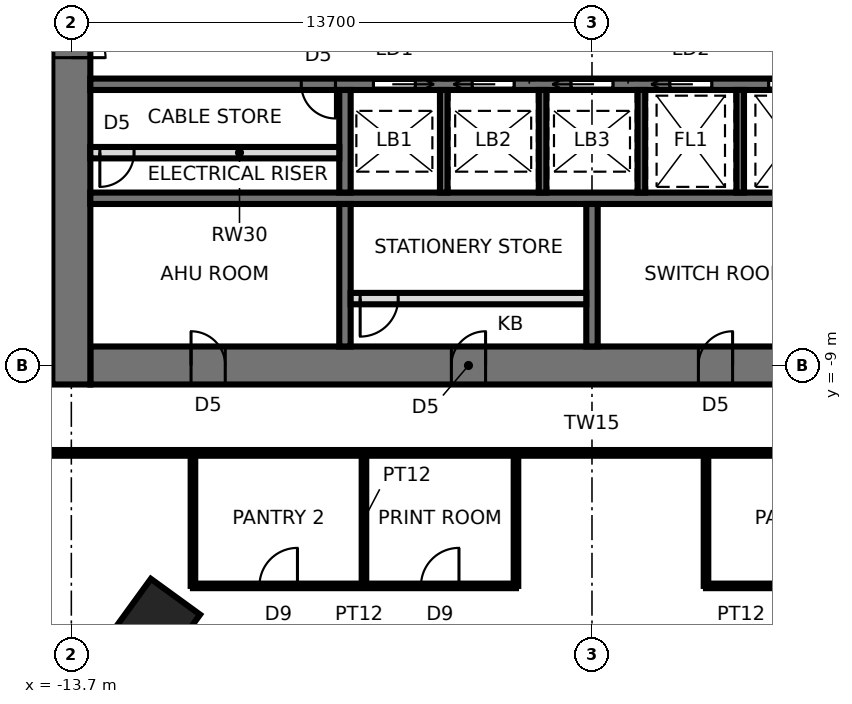
"""IFC4 building model, lengths in metres.
Left out: names, types, materials, properties, quantities, classifications, styles, units other than length and angle.
Written with IfcOpenShell. Run it as: python <this file> out.ifc"""

import sys

from ifc_helpers import new_model, si_unit, direction, frame, frame_2d, origin, origin_2d, place, context, subcontext, project, spatial, rectangle, extrude, element, fill, save


model = new_model("IFC4")
c1 = context("Model", 3, precision=1e-05, world=origin(), true_north=direction((0.0, 1.0)))
c2 = subcontext(c1, "Body", "Model", "MODEL_VIEW")
j1 = project(units=[si_unit("LENGTHUNIT", "METRE"), si_unit("PLANEANGLEUNIT", "RADIAN")], contexts=[c1])
p1 = place(None, origin())
s1 = spatial("IfcSite", under=j1, at=p1, CompositionType="ELEMENT")
p2 = place(p1, origin())
s2 = spatial("IfcBuilding", under=s1, at=p2, CompositionType="ELEMENT")
p3 = place(p2, frame((0.0, 0.0, 108.0)))
s3 = spatial("IfcBuildingStorey", under=s2, at=p3, CompositionType="ELEMENT", Elevation=108.0)
p4 = place(p3, frame((-11.43, -15.733, 0.0), z_axis=(0.0, 0.0, 1.0), x_axis=(-0.587785252292, -0.809016994375, 0.0)))
e1 = element("IfcColumn", 1, at=p4, inside=s3, PredefinedType="COLUMN", context=c2, shape_type="SweptSolid", body=[
    extrude(rectangle(XDim=1.6, YDim=1.6, at=origin_2d()), origin(), (0.0, 0.0, 1.0), 3.9),
])
p5 = place(p3, frame((-13.2, -9.0, 0.0), z_axis=(0.0, 0.0, 1.0), x_axis=(1.0, 0.0, 0.0)))
e2 = element("IfcWall", 2, at=p5, inside=s3, PredefinedType="SHEAR", context=c2, shape_type="SweptSolid", body=[
    extrude(rectangle(XDim=26.4, YDim=1.0, at=frame_2d((13.2, 0.0))), origin(), (0.0, 0.0, 1.0), 3.9),
])
p6 = place(p5, frame((2.65, 0.0, 0.0)))
e3 = element("IfcOpeningElement", 3, at=p6, cuts=e2, PredefinedType="OPENING", context=c2, shape_type="SweptSolid", body=[
    extrude(rectangle(XDim=0.9, YDim=2.1, at=frame_2d((0.45, 1.05))), frame((0.0, 0.51, 0.0), z_axis=(0.0, -1.0, 0.0), x_axis=(1.0, 0.0, 0.0)), (0.0, 0.0, 1.0), 1.02),
])
p7 = place(p5, frame((9.5, 0.0, 0.0)))
e4 = element("IfcOpeningElement", 4, at=p7, cuts=e2, PredefinedType="OPENING", context=c2, shape_type="SweptSolid", body=[
    extrude(rectangle(XDim=0.9, YDim=2.1, at=frame_2d((0.45, 1.05))), frame((0.0, 0.51, 0.0), z_axis=(0.0, -1.0, 0.0), x_axis=(1.0, 0.0, 0.0)), (0.0, 0.0, 1.0), 1.02),
])
p8 = place(p5, frame((16.0, 0.0, 0.0)))
e5 = element("IfcOpeningElement", 5, at=p8, cuts=e2, PredefinedType="OPENING", context=c2, shape_type="SweptSolid", body=[
    extrude(rectangle(XDim=0.9, YDim=2.1, at=frame_2d((0.45, 1.05))), frame((0.0, 0.51, 0.0), z_axis=(0.0, -1.0, 0.0), x_axis=(1.0, 0.0, 0.0)), (0.0, 0.0, 1.0), 1.02),
])
p9 = place(p5, frame((22.85, 0.0, 0.0)))
e6 = element("IfcOpeningElement", 6, at=p9, cuts=e2, PredefinedType="OPENING", context=c2, shape_type="SweptSolid", body=[
    extrude(rectangle(XDim=0.9, YDim=2.1, at=frame_2d((0.45, 1.05))), frame((0.0, 0.51, 0.0), z_axis=(0.0, -1.0, 0.0), x_axis=(1.0, 0.0, 0.0)), (0.0, 0.0, 1.0), 1.02),
])
p10 = place(p3, frame((-13.7, 9.5, 0.0), z_axis=(0.0, 0.0, 1.0), x_axis=(0.0, -1.0, 0.0)))
e7 = element("IfcWall", 7, at=p10, inside=s3, PredefinedType="SHEAR", context=c2, shape_type="SweptSolid", body=[
    extrude(rectangle(XDim=19.0, YDim=1.0, at=frame_2d((9.5, 0.0))), origin(), (0.0, 0.0, 1.0), 3.9),
])
p11 = place(p10, frame((8.6, 0.0, 0.0)))
e8 = element("IfcOpeningElement", 8, at=p11, cuts=e7, PredefinedType="OPENING", context=c2, shape_type="SweptSolid", body=[
    extrude(rectangle(XDim=1.8, YDim=2.4, at=frame_2d((0.9, 1.2))), frame((0.0, 0.51, 0.0), z_axis=(0.0, -1.0, 0.0), x_axis=(1.0, 0.0, 0.0)), (0.0, 0.0, 1.0), 1.02),
])
p12 = place(p3, frame((-13.2, -1.6, 0.0), z_axis=(0.0, 0.0, 1.0), x_axis=(1.0, 0.0, 0.0)))
e9 = element("IfcWall", 9, at=p12, inside=s3, PredefinedType="SHEAR", context=c2, shape_type="SweptSolid", body=[
    extrude(rectangle(XDim=26.4, YDim=0.3, at=frame_2d((13.2, 0.0))), origin(), (0.0, 0.0, 1.0), 3.9),
])
p13 = place(p12, frame((25.15, 0.0, 0.0)))
e10 = element("IfcOpeningElement", 10, at=p13, cuts=e9, PredefinedType="OPENING", context=c2, shape_type="SweptSolid", body=[
    extrude(rectangle(XDim=1.0, YDim=2.1, at=frame_2d((0.5, 1.05))), frame((0.0, 0.16, 0.0), z_axis=(0.0, -1.0, 0.0), x_axis=(1.0, 0.0, 0.0)), (0.0, 0.0, 1.0), 0.32),
])
p14 = place(p12, frame((7.45, 0.0, 0.0)))
e11 = element("IfcOpeningElement", 11, at=p14, cuts=e9, PredefinedType="OPENING", context=c2, shape_type="SweptSolid", body=[
    extrude(rectangle(XDim=1.1, YDim=2.3, at=frame_2d((0.55, 1.15))), frame((0.0, 0.16, 0.0), z_axis=(0.0, -1.0, 0.0), x_axis=(1.0, 0.0, 0.0)), (0.0, 0.0, 1.0), 0.32),
])
p15 = place(p12, frame((10.05, 0.0, 0.0)))
e12 = element("IfcOpeningElement", 12, at=p15, cuts=e9, PredefinedType="OPENING", context=c2, shape_type="SweptSolid", body=[
    extrude(rectangle(XDim=1.1, YDim=2.3, at=frame_2d((0.55, 1.15))), frame((0.0, 0.16, 0.0), z_axis=(0.0, -1.0, 0.0), x_axis=(1.0, 0.0, 0.0)), (0.0, 0.0, 1.0), 0.32),
])
p16 = place(p12, frame((12.65, 0.0, 0.0)))
e13 = element("IfcOpeningElement", 13, at=p16, cuts=e9, PredefinedType="OPENING", context=c2, shape_type="SweptSolid", body=[
    extrude(rectangle(XDim=1.1, YDim=2.3, at=frame_2d((0.55, 1.15))), frame((0.0, 0.16, 0.0), z_axis=(0.0, -1.0, 0.0), x_axis=(1.0, 0.0, 0.0)), (0.0, 0.0, 1.0), 0.32),
])
p17 = place(p12, frame((15.25, 0.0, 0.0)))
e14 = element("IfcOpeningElement", 14, at=p17, cuts=e9, PredefinedType="OPENING", context=c2, shape_type="SweptSolid", body=[
    extrude(rectangle(XDim=1.1, YDim=2.3, at=frame_2d((0.55, 1.15))), frame((0.0, 0.16, 0.0), z_axis=(0.0, -1.0, 0.0), x_axis=(1.0, 0.0, 0.0)), (0.0, 0.0, 1.0), 0.32),
])
p18 = place(p12, frame((17.85, 0.0, 0.0)))
e15 = element("IfcOpeningElement", 15, at=p18, cuts=e9, PredefinedType="OPENING", context=c2, shape_type="SweptSolid", body=[
    extrude(rectangle(XDim=1.1, YDim=2.3, at=frame_2d((0.55, 1.15))), frame((0.0, 0.16, 0.0), z_axis=(0.0, -1.0, 0.0), x_axis=(1.0, 0.0, 0.0)), (0.0, 0.0, 1.0), 0.32),
])
p19 = place(p12, frame((5.55, 0.0, 0.0)))
e16 = element("IfcOpeningElement", 16, at=p19, cuts=e9, PredefinedType="OPENING", context=c2, shape_type="SweptSolid", body=[
    extrude(rectangle(XDim=0.9, YDim=2.1, at=frame_2d((0.45, 1.05))), frame((0.0, 0.16, 0.0), z_axis=(0.0, -1.0, 0.0), x_axis=(1.0, 0.0, 0.0)), (0.0, 0.0, 1.0), 0.32),
])
p20 = place(p3, frame((-13.2, -4.6, 0.0), z_axis=(0.0, 0.0, 1.0), x_axis=(1.0, 0.0, 0.0)))
e17 = element("IfcWall", 17, at=p20, inside=s3, PredefinedType="SHEAR", context=c2, shape_type="SweptSolid", body=[
    extrude(rectangle(XDim=26.4, YDim=0.3, at=frame_2d((13.2, 0.0))), origin(), (0.0, 0.0, 1.0), 3.9),
])
p21 = place(p3, frame((-6.5, -1.75, 0.0), z_axis=(0.0, 0.0, 1.0), x_axis=(0.0, -1.0, 0.0)))
e18 = element("IfcWall", 18, at=p21, inside=s3, PredefinedType="SHEAR", context=c2, shape_type="SweptSolid", body=[
    extrude(rectangle(XDim=2.7, YDim=0.3, at=frame_2d((1.35, 0.0))), origin(), (0.0, 0.0, 1.0), 3.9),
])
p22 = place(p3, frame((-6.5, -4.75, 0.0), z_axis=(0.0, 0.0, 1.0), x_axis=(0.0, -1.0, 0.0)))
e19 = element("IfcWall", 19, at=p22, inside=s3, PredefinedType="SHEAR", context=c2, shape_type="SweptSolid", body=[
    extrude(rectangle(XDim=3.75, YDim=0.3, at=frame_2d((1.875, 0.0))), origin(), (0.0, 0.0, 1.0), 3.9),
])
for number, where, z_axis, x_axis in (
    (20, (-3.9, -1.75, 0.0), (0.0, 0.0, 1.0), (0.0, -1.0, 0.0)),
    (21, (-1.3, -1.75, 0.0), (0.0, 0.0, 1.0), (0.0, -1.0, 0.0)),
    (22, (1.3, -1.75, 0.0), (0.0, 0.0, 1.0), (0.0, -1.0, 0.0)),
    (23, (3.9, -1.75, 0.0), (0.0, 0.0, 1.0), (0.0, -1.0, 0.0)),
):
    element("IfcWall", number, at=place(p3, frame(where, z_axis=z_axis, x_axis=x_axis)), inside=s3, PredefinedType="SHEAR", context=c2, shape_type="SweptSolid", body=[
        extrude(rectangle(XDim=2.7, YDim=0.2, at=frame_2d((1.35, 0.0))), origin(), (0.0, 0.0, 1.0), 3.9),
    ])
p23 = place(p3, frame((0.0, -4.75, 0.0), z_axis=(0.0, 0.0, 1.0), x_axis=(0.0, -1.0, 0.0)))
e24 = element("IfcWall", 24, at=p23, inside=s3, PredefinedType="SHEAR", context=c2, shape_type="SweptSolid", body=[
    extrude(rectangle(XDim=3.75, YDim=0.3, at=frame_2d((1.875, 0.0))), origin(), (0.0, 0.0, 1.0), 3.9),
])
p24 = place(p3, frame((-6.35, -7.24, 0.0), z_axis=(0.0, 0.0, 1.0), x_axis=(1.0, 0.0, 0.0)))
e25 = element("IfcWall", 25, at=p24, inside=s3, PredefinedType="PARTITIONING", context=c2, shape_type="SweptSolid", body=[
    extrude(rectangle(XDim=6.2, YDim=0.3, at=frame_2d((3.1, 0.0))), origin(), (0.0, 0.0, 1.0), 3.74),
])
p25 = place(p24, frame((0.25, 0.0, 0.0)))
e26 = element("IfcOpeningElement", 26, at=p25, cuts=e25, PredefinedType="OPENING", context=c2, shape_type="SweptSolid", body=[
    extrude(rectangle(XDim=1.0, YDim=2.4, at=frame_2d((0.5, 1.2))), frame((0.0, 0.16, 0.0), z_axis=(0.0, -1.0, 0.0), x_axis=(1.0, 0.0, 0.0)), (0.0, 0.0, 1.0), 0.32),
])
p26 = place(p3, frame((-13.2, -3.4, 0.0), z_axis=(0.0, 0.0, 1.0), x_axis=(1.0, 0.0, 0.0)))
e27 = element("IfcWall", 27, at=p26, inside=s3, PredefinedType="SOLIDWALL", context=c2, shape_type="SweptSolid", body=[
    extrude(rectangle(XDim=6.55, YDim=0.3, at=frame_2d((3.275, 0.0))), origin(), (0.0, 0.0, 1.0), 3.74),
])
p27 = place(p26, frame((0.25, 0.0, 0.0)))
e28 = element("IfcOpeningElement", 28, at=p27, cuts=e27, PredefinedType="OPENING", context=c2, shape_type="SweptSolid", body=[
    extrude(rectangle(XDim=0.9, YDim=2.1, at=frame_2d((0.45, 1.05))), frame((0.0, 0.16, 0.0), z_axis=(0.0, -1.0, 0.0), x_axis=(1.0, 0.0, 0.0)), (0.0, 0.0, 1.0), 0.32),
])
for number, where, z_axis, x_axis in (
    (29, (-10.5, -11.3, 0.0), (0.0, 0.0, 1.0), (0.0, -1.0, 0.0)),
    (30, (-6.0, -11.3, 0.0), (0.0, 0.0, 1.0), (0.0, -1.0, 0.0)),
):
    element("IfcWall", number, at=place(p3, frame(where, z_axis=z_axis, x_axis=x_axis)), inside=s3, PredefinedType="PARTITIONING", context=c2, shape_type="SweptSolid", body=[
        extrude(rectangle(XDim=3.5, YDim=0.12, at=frame_2d((1.75, 0.0))), origin(), (0.0, 0.0, 1.0), 3.74),
    ])
p28 = place(p3, frame((-10.5, -14.8, 0.0), z_axis=(0.0, 0.0, 1.0), x_axis=(1.0, 0.0, 0.0)))
e31 = element("IfcWall", 31, at=p28, inside=s3, PredefinedType="PARTITIONING", context=c2, shape_type="SweptSolid", body=[
    extrude(rectangle(XDim=8.5, YDim=0.12, at=frame_2d((4.25, 0.0))), origin(), (0.0, 0.0, 1.0), 3.74),
])
p29 = place(p28, frame((1.75, 0.0, 0.0)))
e32 = element("IfcOpeningElement", 32, at=p29, cuts=e31, PredefinedType="OPENING", context=c2, shape_type="SweptSolid", body=[
    extrude(rectangle(XDim=1.0, YDim=2.4, at=frame_2d((0.5, 1.2))), frame((0.0, 0.07, 0.0), z_axis=(0.0, -1.0, 0.0), x_axis=(1.0, 0.0, 0.0)), (0.0, 0.0, 1.0), 0.14),
])
p30 = place(p28, frame((6.0, 0.0, 0.0)))
e33 = element("IfcOpeningElement", 33, at=p30, cuts=e31, PredefinedType="OPENING", context=c2, shape_type="SweptSolid", body=[
    extrude(rectangle(XDim=1.0, YDim=2.4, at=frame_2d((0.5, 1.2))), frame((0.0, 0.07, 0.0), z_axis=(0.0, -1.0, 0.0), x_axis=(1.0, 0.0, 0.0)), (0.0, 0.0, 1.0), 0.14),
])
p31 = place(p3, frame((-2.0, -14.8, 0.0), z_axis=(0.0, 0.0, 1.0), x_axis=(0.0, 1.0, 0.0)))
e34 = element("IfcWall", 34, at=p31, inside=s3, PredefinedType="PARTITIONING", context=c2, shape_type="SweptSolid", body=[
    extrude(rectangle(XDim=3.5, YDim=0.12, at=frame_2d((1.75, 0.0))), origin(), (0.0, 0.0, 1.0), 3.74),
])
p32 = place(p3, frame((-16.0, -11.3, 0.0), z_axis=(0.0, 0.0, 1.0), x_axis=(1.0, 0.0, 0.0)))
e35 = element("IfcWall", 35, at=p32, inside=s3, PredefinedType="PARTITIONING", context=c2, shape_type="SweptSolid", body=[
    extrude(rectangle(XDim=32.0, YDim=0.15, at=frame_2d((16.0, 0.0))), origin(), (0.0, 0.0, 1.0), 3.74),
])
p33 = place(p3, frame((3.0, -11.3, 0.0), z_axis=(0.0, 0.0, 1.0), x_axis=(0.0, -1.0, 0.0)))
e36 = element("IfcWall", 36, at=p33, inside=s3, PredefinedType="PARTITIONING", context=c2, shape_type="SweptSolid", body=[
    extrude(rectangle(XDim=3.5, YDim=0.12, at=frame_2d((1.75, 0.0))), origin(), (0.0, 0.0, 1.0), 3.74),
])
p34 = place(p3, frame((3.0, -14.8, 0.0), z_axis=(0.0, 0.0, 1.0), x_axis=(1.0, 0.0, 0.0)))
e37 = element("IfcWall", 37, at=p34, inside=s3, PredefinedType="PARTITIONING", context=c2, shape_type="SweptSolid", body=[
    extrude(rectangle(XDim=5.0, YDim=0.12, at=frame_2d((2.5, 0.0))), origin(), (0.0, 0.0, 1.0), 3.74),
])
p35 = place(p34, frame((2.0, 0.0, 0.0)))
e38 = element("IfcOpeningElement", 38, at=p35, cuts=e37, PredefinedType="OPENING", context=c2, shape_type="SweptSolid", body=[
    extrude(rectangle(XDim=1.0, YDim=2.4, at=frame_2d((0.5, 1.2))), frame((0.0, 0.07, 0.0), z_axis=(0.0, -1.0, 0.0), x_axis=(1.0, 0.0, 0.0)), (0.0, 0.0, 1.0), 0.14),
])
p36 = place(p11, origin())
e39 = element("IfcDoor", 39, at=p36, inside=s3, OperationType="DOUBLE_DOOR_SINGLE_SWING", PredefinedType="DOOR", context=c2, shape_type="SweptSolid", body=[
    extrude(rectangle(XDim=1.72, YDim=2.36, at=frame_2d((0.9, 1.18))), frame((0.0, 0.025, 0.0), z_axis=(0.0, -1.0, 0.0), x_axis=(1.0, 0.0, 0.0)), (0.0, 0.0, 1.0), 0.05),
    extrude(rectangle(XDim=0.04, YDim=2.4, at=frame_2d((0.02, 1.2))), frame((0.0, 0.25, 0.0), z_axis=(0.0, -1.0, 0.0), x_axis=(1.0, 0.0, 0.0)), (0.0, 0.0, 1.0), 0.5),
    extrude(rectangle(XDim=0.04, YDim=2.4, at=frame_2d((1.78, 1.2))), frame((0.0, 0.25, 0.0), z_axis=(0.0, -1.0, 0.0), x_axis=(1.0, 0.0, 0.0)), (0.0, 0.0, 1.0), 0.5),
    extrude(rectangle(XDim=1.72, YDim=0.04, at=frame_2d((0.9, 2.38))), frame((0.0, 0.25, 0.0), z_axis=(0.0, -1.0, 0.0), x_axis=(1.0, 0.0, 0.0)), (0.0, 0.0, 1.0), 0.5),
])
fill(e8, e39)
p37 = place(p14, frame((1.1, 0.0, 0.0), z_axis=(0.0, 0.0, 1.0), x_axis=(-1.0, 0.0, 0.0)))
e40 = element("IfcDoor", 40, at=p37, inside=s3, OperationType="SLIDING_TO_LEFT", PredefinedType="DOOR", context=c2, shape_type="SweptSolid", body=[
    extrude(rectangle(XDim=1.1, YDim=2.3, at=frame_2d((0.55, 1.15))), frame((0.0, 0.025, 0.0), z_axis=(0.0, -1.0, 0.0), x_axis=(1.0, 0.0, 0.0)), (0.0, 0.0, 1.0), 0.05),
])
fill(e11, e40)
p38 = place(p15, frame((1.1, 0.0, 0.0), z_axis=(0.0, 0.0, 1.0), x_axis=(-1.0, 0.0, 0.0)))
e41 = element("IfcDoor", 41, at=p38, inside=s3, OperationType="SLIDING_TO_RIGHT", PredefinedType="DOOR", context=c2, shape_type="SweptSolid", body=[
    extrude(rectangle(XDim=1.1, YDim=2.3, at=frame_2d((0.55, 1.15))), frame((0.0, 0.025, 0.0), z_axis=(0.0, -1.0, 0.0), x_axis=(1.0, 0.0, 0.0)), (0.0, 0.0, 1.0), 0.05),
])
fill(e12, e41)
p39 = place(p16, frame((1.1, 0.0, 0.0), z_axis=(0.0, 0.0, 1.0), x_axis=(-1.0, 0.0, 0.0)))
e42 = element("IfcDoor", 42, at=p39, inside=s3, OperationType="SLIDING_TO_RIGHT", PredefinedType="DOOR", context=c2, shape_type="SweptSolid", body=[
    extrude(rectangle(XDim=1.1, YDim=2.3, at=frame_2d((0.55, 1.15))), frame((0.0, 0.025, 0.0), z_axis=(0.0, -1.0, 0.0), x_axis=(1.0, 0.0, 0.0)), (0.0, 0.0, 1.0), 0.05),
])
fill(e13, e42)
p40 = place(p17, frame((1.1, 0.0, 0.0), z_axis=(0.0, 0.0, 1.0), x_axis=(-1.0, 0.0, 0.0)))
e43 = element("IfcDoor", 43, at=p40, inside=s3, OperationType="SLIDING_TO_RIGHT", PredefinedType="DOOR", context=c2, shape_type="SweptSolid", body=[
    extrude(rectangle(XDim=1.1, YDim=2.3, at=frame_2d((0.55, 1.15))), frame((0.0, 0.025, 0.0), z_axis=(0.0, -1.0, 0.0), x_axis=(1.0, 0.0, 0.0)), (0.0, 0.0, 1.0), 0.05),
])
fill(e14, e43)
p41 = place(p18, frame((1.1, 0.0, 0.0), z_axis=(0.0, 0.0, 1.0), x_axis=(-1.0, 0.0, 0.0)))
e44 = element("IfcDoor", 44, at=p41, inside=s3, OperationType="SLIDING_TO_LEFT", PredefinedType="DOOR", context=c2, shape_type="SweptSolid", body=[
    extrude(rectangle(XDim=1.1, YDim=2.3, at=frame_2d((0.55, 1.15))), frame((0.0, 0.025, 0.0), z_axis=(0.0, -1.0, 0.0), x_axis=(1.0, 0.0, 0.0)), (0.0, 0.0, 1.0), 0.05),
])
fill(e15, e44)
p42 = place(p19, frame((0.9, 0.0, 0.0), z_axis=(0.0, 0.0, 1.0), x_axis=(-1.0, 0.0, 0.0)))
e45 = element("IfcDoor", 45, at=p42, inside=s3, OperationType="SINGLE_SWING_LEFT", PredefinedType="DOOR", context=c2, shape_type="SweptSolid", body=[
    extrude(rectangle(XDim=0.9, YDim=2.1, at=frame_2d((0.45, 1.05))), frame((0.0, 0.025, 0.0), z_axis=(0.0, -1.0, 0.0), x_axis=(1.0, 0.0, 0.0)), (0.0, 0.0, 1.0), 0.05),
])
fill(e16, e45)
p43 = place(p6, origin())
e46 = element("IfcDoor", 46, at=p43, inside=s3, OperationType="SINGLE_SWING_LEFT", PredefinedType="DOOR", context=c2, shape_type="SweptSolid", body=[
    extrude(rectangle(XDim=0.82, YDim=2.06, at=frame_2d((0.45, 1.03))), frame((0.0, 0.025, 0.0), z_axis=(0.0, -1.0, 0.0), x_axis=(1.0, 0.0, 0.0)), (0.0, 0.0, 1.0), 0.05),
    extrude(rectangle(XDim=0.04, YDim=2.1, at=frame_2d((0.02, 1.05))), frame((0.0, 0.25, 0.0), z_axis=(0.0, -1.0, 0.0), x_axis=(1.0, 0.0, 0.0)), (0.0, 0.0, 1.0), 0.5),
    extrude(rectangle(XDim=0.04, YDim=2.1, at=frame_2d((0.88, 1.05))), frame((0.0, 0.25, 0.0), z_axis=(0.0, -1.0, 0.0), x_axis=(1.0, 0.0, 0.0)), (0.0, 0.0, 1.0), 0.5),
    extrude(rectangle(XDim=0.82, YDim=0.04, at=frame_2d((0.45, 2.08))), frame((0.0, 0.25, 0.0), z_axis=(0.0, -1.0, 0.0), x_axis=(1.0, 0.0, 0.0)), (0.0, 0.0, 1.0), 0.5),
])
fill(e3, e46)
p44 = place(p7, origin())
e47 = element("IfcDoor", 47, at=p44, inside=s3, OperationType="SINGLE_SWING_RIGHT", PredefinedType="DOOR", context=c2, shape_type="SweptSolid", body=[
    extrude(rectangle(XDim=0.82, YDim=2.06, at=frame_2d((0.45, 1.03))), frame((0.0, 0.025, 0.0), z_axis=(0.0, -1.0, 0.0), x_axis=(1.0, 0.0, 0.0)), (0.0, 0.0, 1.0), 0.05),
    extrude(rectangle(XDim=0.04, YDim=2.1, at=frame_2d((0.02, 1.05))), frame((0.0, 0.25, 0.0), z_axis=(0.0, -1.0, 0.0), x_axis=(1.0, 0.0, 0.0)), (0.0, 0.0, 1.0), 0.5),
    extrude(rectangle(XDim=0.04, YDim=2.1, at=frame_2d((0.88, 1.05))), frame((0.0, 0.25, 0.0), z_axis=(0.0, -1.0, 0.0), x_axis=(1.0, 0.0, 0.0)), (0.0, 0.0, 1.0), 0.5),
    extrude(rectangle(XDim=0.82, YDim=0.04, at=frame_2d((0.45, 2.08))), frame((0.0, 0.25, 0.0), z_axis=(0.0, -1.0, 0.0), x_axis=(1.0, 0.0, 0.0)), (0.0, 0.0, 1.0), 0.5),
])
fill(e4, e47)
p45 = place(p8, origin())
e48 = element("IfcDoor", 48, at=p45, inside=s3, OperationType="SINGLE_SWING_RIGHT", PredefinedType="DOOR", context=c2, shape_type="SweptSolid", body=[
    extrude(rectangle(XDim=0.82, YDim=2.06, at=frame_2d((0.45, 1.03))), frame((0.0, 0.025, 0.0), z_axis=(0.0, -1.0, 0.0), x_axis=(1.0, 0.0, 0.0)), (0.0, 0.0, 1.0), 0.05),
    extrude(rectangle(XDim=0.04, YDim=2.1, at=frame_2d((0.02, 1.05))), frame((0.0, 0.25, 0.0), z_axis=(0.0, -1.0, 0.0), x_axis=(1.0, 0.0, 0.0)), (0.0, 0.0, 1.0), 0.5),
    extrude(rectangle(XDim=0.04, YDim=2.1, at=frame_2d((0.88, 1.05))), frame((0.0, 0.25, 0.0), z_axis=(0.0, -1.0, 0.0), x_axis=(1.0, 0.0, 0.0)), (0.0, 0.0, 1.0), 0.5),
    extrude(rectangle(XDim=0.82, YDim=0.04, at=frame_2d((0.45, 2.08))), frame((0.0, 0.25, 0.0), z_axis=(0.0, -1.0, 0.0), x_axis=(1.0, 0.0, 0.0)), (0.0, 0.0, 1.0), 0.5),
])
fill(e5, e48)
p46 = place(p25, frame((1.0, 0.0, 0.0), z_axis=(0.0, 0.0, 1.0), x_axis=(-1.0, 0.0, 0.0)))
e49 = element("IfcDoor", 49, at=p46, inside=s3, OperationType="SINGLE_SWING_RIGHT", PredefinedType="DOOR", context=c2, shape_type="SweptSolid", body=[
    extrude(rectangle(XDim=1.0, YDim=2.4, at=frame_2d((0.5, 1.2))), frame((0.0, 0.025, 0.0), z_axis=(0.0, -1.0, 0.0), x_axis=(1.0, 0.0, 0.0)), (0.0, 0.0, 1.0), 0.05),
])
fill(e26, e49)
p47 = place(p27, frame((0.9, 0.0, 0.0), z_axis=(0.0, 0.0, 1.0), x_axis=(-1.0, 0.0, 0.0)))
e50 = element("IfcDoor", 50, at=p47, inside=s3, OperationType="SINGLE_SWING_RIGHT", PredefinedType="DOOR", context=c2, shape_type="SweptSolid", body=[
    extrude(rectangle(XDim=0.9, YDim=2.1, at=frame_2d((0.45, 1.05))), frame((0.0, 0.025, 0.0), z_axis=(0.0, -1.0, 0.0), x_axis=(1.0, 0.0, 0.0)), (0.0, 0.0, 1.0), 0.05),
])
fill(e28, e50)
p48 = place(p29, origin())
e51 = element("IfcDoor", 51, at=p48, inside=s3, OperationType="SINGLE_SWING_RIGHT", PredefinedType="DOOR", context=c2, shape_type="SweptSolid", body=[
    extrude(rectangle(XDim=1.0, YDim=2.4, at=frame_2d((0.5, 1.2))), frame((0.0, 0.025, 0.0), z_axis=(0.0, -1.0, 0.0), x_axis=(1.0, 0.0, 0.0)), (0.0, 0.0, 1.0), 0.05),
])
fill(e32, e51)
p49 = place(p30, origin())
e52 = element("IfcDoor", 52, at=p49, inside=s3, OperationType="SINGLE_SWING_RIGHT", PredefinedType="DOOR", context=c2, shape_type="SweptSolid", body=[
    extrude(rectangle(XDim=1.0, YDim=2.4, at=frame_2d((0.5, 1.2))), frame((0.0, 0.025, 0.0), z_axis=(0.0, -1.0, 0.0), x_axis=(1.0, 0.0, 0.0)), (0.0, 0.0, 1.0), 0.05),
])
fill(e33, e52)
save(model, sys.argv[1])
